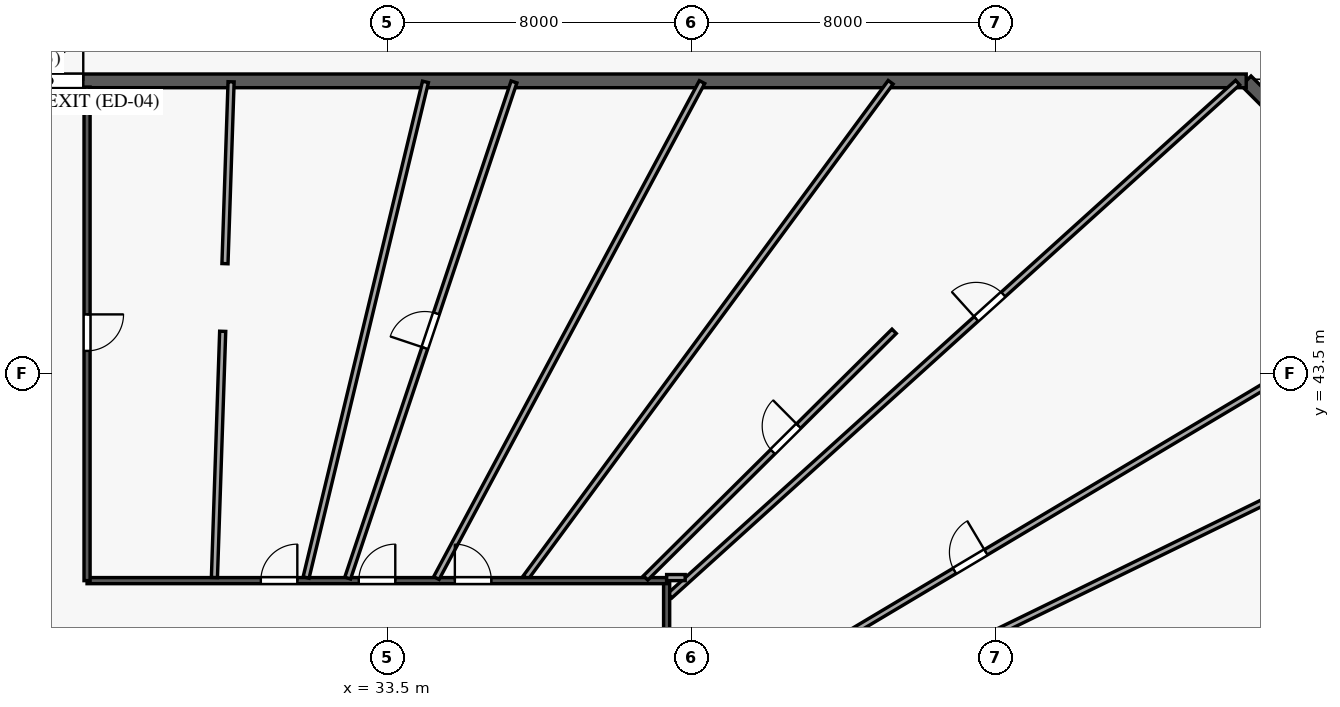
"""IFC4 building model, lengths in metres.
Left out: names, types, materials, properties, quantities, classifications, styles, units other than length and angle.
Written with IfcOpenShell. Run it as: python <this file> out.ifc"""

import sys

from ifc_helpers import new_model, si_unit, direction, frame, frame_2d, origin, origin_with_axes, origin_2d, place, context, subcontext, project, spatial, rectangle, circle, extrude, source, transform, mapped, element, fill, save


model = new_model("IFC4")
c1 = context("Model", 3, precision=1e-05, world=origin(), true_north=direction((0.0, 1.0)))
c2 = subcontext(c1, "Body", "Model", "MODEL_VIEW")
j1 = project(units=[si_unit("LENGTHUNIT", "METRE"), si_unit("PLANEANGLEUNIT", "RADIAN")], contexts=[c1])
p1 = place(None, origin())
s1 = spatial("IfcSite", under=j1, at=p1, CompositionType="ELEMENT")
p2 = place(p1, origin())
s2 = spatial("IfcBuilding", under=s1, at=p2, CompositionType="ELEMENT")
p3 = place(p2, origin())
s3 = spatial("IfcBuildingStorey", under=s2, at=p3, CompositionType="ELEMENT", Elevation=0.0)
m1 = source(origin_with_axes(), c2, "Body", "SweptSolid", [
    extrude(circle(Radius=0.9, at=origin_2d()), origin(), (0.0, 0.0, 1.0), 4.5),
])
for number, where, z_axis, x_axis in (
    (1, (28.5, 45.5, 0.0), (0.0, 0.0, 1.0), (1.0, 0.0, 0.0)),
    (2, (46.8, 45.5, 0.0), (0.0, 0.0, 1.0), (1.0, 0.0, 0.0)),
):
    element("IfcColumn", number, at=place(p3, frame(where, z_axis=z_axis, x_axis=x_axis)), inside=s3, PredefinedType="COLUMN", context=c2, shape_type="MappedRepresentation", body=[
        mapped(m1, transform((0.0, 0.0, 0.0), scale=1.0)),
    ])
m2 = source(origin_with_axes(), c2, "Body", "SweptSolid", [
    extrude(rectangle(XDim=0.6, YDim=0.9, at=origin_2d()), origin(), (0.0, 0.0, 1.0), 4.5),
])
p4 = place(p3, frame((54.8, 42.5, 0.0), z_axis=(0.0, 0.0, 1.0), x_axis=(1.0, 0.0, 0.0)))
e3 = element("IfcColumn", 3, at=p4, inside=s3, PredefinedType="PILASTER", context=c2, shape_type="MappedRepresentation", body=[
    mapped(m2, transform((0.0, 0.0, 0.0), scale=1.0)),
])
p5 = place(p3, frame((56.8, 50.5, 0.0), z_axis=(0.0, 0.0, 1.0), x_axis=(-0.707106781187, 0.707106781187, 0.0)))
e4 = element("IfcWall", 4, at=p5, inside=s3, PredefinedType="SOLIDWALL", context=c2, shape_type="SweptSolid", body=[
    extrude(rectangle(XDim=0.99, YDim=0.36, at=frame_2d((0.495, 0.0))), origin(), (0.0, 0.0, 1.0), 4.2),
])
p6 = place(p3, frame((1.5, 51.2, 0.0), z_axis=(0.0, 0.0, 1.0), x_axis=(1.0, 0.0, 0.0)))
e5 = element("IfcWall", 5, at=p6, inside=s3, PredefinedType="SOLIDWALL", context=c2, shape_type="SweptSolid", body=[
    extrude(rectangle(XDim=54.6, YDim=0.36, at=frame_2d((27.3, 0.0))), origin(), (0.0, 0.0, 1.0), 4.2),
])
p7 = place(p6, frame((51.007, 0.0, 0.85)))
e6 = element("IfcOpeningElement", 6, at=p7, cuts=e5, PredefinedType="OPENING", context=c2, shape_type="SweptSolid", body=[
    extrude(rectangle(XDim=1.8, YDim=2.2, at=frame_2d((0.9, 1.1))), frame((0.0, 0.19, 0.0), z_axis=(0.0, -1.0, 0.0), x_axis=(1.0, 0.0, 0.0)), (0.0, 0.0, 1.0), 0.38),
])
p8 = place(p6, frame((46.765, 0.0, 0.85)))
e7 = element("IfcOpeningElement", 7, at=p8, cuts=e5, PredefinedType="OPENING", context=c2, shape_type="SweptSolid", body=[
    extrude(rectangle(XDim=1.8, YDim=2.2, at=frame_2d((0.9, 1.1))), frame((0.0, 0.19, 0.0), z_axis=(0.0, -1.0, 0.0), x_axis=(1.0, 0.0, 0.0)), (0.0, 0.0, 1.0), 0.38),
])
p9 = place(p6, frame((41.844, 0.0, 0.85)))
e8 = element("IfcOpeningElement", 8, at=p9, cuts=e5, PredefinedType="OPENING", context=c2, shape_type="SweptSolid", body=[
    extrude(rectangle(XDim=1.8, YDim=2.2, at=frame_2d((0.9, 1.1))), frame((0.0, 0.19, 0.0), z_axis=(0.0, -1.0, 0.0), x_axis=(1.0, 0.0, 0.0)), (0.0, 0.0, 1.0), 0.38),
])
p10 = place(p6, frame((36.894, 0.0, 0.85)))
e9 = element("IfcOpeningElement", 9, at=p10, cuts=e5, PredefinedType="OPENING", context=c2, shape_type="SweptSolid", body=[
    extrude(rectangle(XDim=1.8, YDim=2.2, at=frame_2d((0.9, 1.1))), frame((0.0, 0.19, 0.0), z_axis=(0.0, -1.0, 0.0), x_axis=(1.0, 0.0, 0.0)), (0.0, 0.0, 1.0), 0.38),
])
p11 = place(p6, frame((29.542, 0.0, 0.85)))
e10 = element("IfcOpeningElement", 10, at=p11, cuts=e5, PredefinedType="OPENING", context=c2, shape_type="SweptSolid", body=[
    extrude(rectangle(XDim=1.8, YDim=2.2, at=frame_2d((0.9, 1.1))), frame((0.0, 0.19, 0.0), z_axis=(0.0, -1.0, 0.0), x_axis=(1.0, 0.0, 0.0)), (0.0, 0.0, 1.0), 0.38),
])
p12 = place(p6, frame((25.094, 0.0, 0.85)))
e11 = element("IfcOpeningElement", 11, at=p12, cuts=e5, PredefinedType="OPENING", context=c2, shape_type="SweptSolid", body=[
    extrude(rectangle(XDim=1.8, YDim=2.2, at=frame_2d((0.9, 1.1))), frame((0.0, 0.19, 0.0), z_axis=(0.0, -1.0, 0.0), x_axis=(1.0, 0.0, 0.0)), (0.0, 0.0, 1.0), 0.38),
])
p13 = place(p6, frame((11.445, 0.0, 0.85)))
e12 = element("IfcOpeningElement", 12, at=p13, cuts=e5, PredefinedType="OPENING", context=c2, shape_type="SweptSolid", body=[
    extrude(rectangle(XDim=1.8, YDim=2.2, at=frame_2d((0.9, 1.1))), frame((0.0, 0.19, 0.0), z_axis=(0.0, -1.0, 0.0), x_axis=(1.0, 0.0, 0.0)), (0.0, 0.0, 1.0), 0.38),
])
p14 = place(p6, frame((2.908, 0.0, 0.85)))
e13 = element("IfcOpeningElement", 13, at=p14, cuts=e5, PredefinedType="OPENING", context=c2, shape_type="SweptSolid", body=[
    extrude(rectangle(XDim=1.8, YDim=2.2, at=frame_2d((0.9, 1.1))), frame((0.0, 0.19, 0.0), z_axis=(0.0, -1.0, 0.0), x_axis=(1.0, 0.0, 0.0)), (0.0, 0.0, 1.0), 0.38),
])
p15 = place(p6, frame((19.6, 0.0, 0.0)))
e14 = element("IfcOpeningElement", 14, at=p15, cuts=e5, PredefinedType="OPENING", context=c2, shape_type="SweptSolid", body=[
    extrude(rectangle(XDim=1.8, YDim=2.3, at=frame_2d((0.9, 1.15))), frame((0.0, 0.19, 0.0), z_axis=(0.0, -1.0, 0.0), x_axis=(1.0, 0.0, 0.0)), (0.0, 0.0, 1.0), 0.38),
])
p16 = place(p6, frame((22.2, 0.0, 0.0)))
e15 = element("IfcOpeningElement", 15, at=p16, cuts=e5, PredefinedType="OPENING", context=c2, shape_type="SweptSolid", body=[
    extrude(rectangle(XDim=1.8, YDim=2.3, at=frame_2d((0.9, 1.15))), frame((0.0, 0.19, 0.0), z_axis=(0.0, -1.0, 0.0), x_axis=(1.0, 0.0, 0.0)), (0.0, 0.0, 1.0), 0.38),
])
p17 = place(p6, frame((15.5, 0.0, 0.0)))
e16 = element("IfcOpeningElement", 16, at=p17, cuts=e5, PredefinedType="OPENING", context=c2, shape_type="SweptSolid", body=[
    extrude(rectangle(XDim=1.8, YDim=2.3, at=frame_2d((0.9, 1.15))), frame((0.0, 0.19, 0.0), z_axis=(0.0, -1.0, 0.0), x_axis=(1.0, 0.0, 0.0)), (0.0, 0.0, 1.0), 0.38),
])
p18 = place(p3, frame((40.932, 37.652, 0.0), z_axis=(0.0, 0.0, 1.0), x_axis=(0.741982219561, 0.670419559571, 0.0)))
e17 = element("IfcWall", 17, at=p18, inside=s3, PredefinedType="PARTITIONING", context=c2, shape_type="SweptSolid", body=[
    extrude(rectangle(XDim=20.138, YDim=0.16, at=frame_2d((10.069, 0.0))), origin(), (0.0, 0.0, 1.0), 4.2),
])
p19 = place(p18, frame((10.867, 0.0, 0.0)))
e18 = element("IfcOpeningElement", 18, at=p19, cuts=e17, PredefinedType="OPENING", context=c2, shape_type="SweptSolid", body=[
    extrude(rectangle(XDim=0.96, YDim=2.15, at=frame_2d((0.48, 1.075))), frame((0.0, 0.09, 0.0), z_axis=(0.0, -1.0, 0.0), x_axis=(1.0, 0.0, 0.0)), (0.0, 0.0, 1.0), 0.18),
])
p20 = place(p3, frame((40.932, 33.839, 0.0), z_axis=(0.0, 0.0, 1.0), x_axis=(0.859023594577, 0.51193599596, 0.0)))
e19 = element("IfcWall", 19, at=p20, inside=s3, PredefinedType="PARTITIONING", context=c2, shape_type="SweptSolid", body=[
    extrude(rectangle(XDim=18.433, YDim=0.16, at=frame_2d((9.216, 0.0))), origin(), (0.0, 0.0, 1.0), 4.2),
])
p21 = place(p20, frame((8.724, 0.0, 0.0)))
e20 = element("IfcOpeningElement", 20, at=p21, cuts=e19, PredefinedType="OPENING", context=c2, shape_type="SweptSolid", body=[
    extrude(rectangle(XDim=0.96, YDim=2.15, at=frame_2d((0.48, 1.075))), frame((0.0, 0.09, 0.0), z_axis=(0.0, -1.0, 0.0), x_axis=(1.0, 0.0, 0.0)), (0.0, 0.0, 1.0), 0.18),
])
p22 = place(p3, frame((40.85, 38.05, 0.0), z_axis=(0.0, 0.0, 1.0), x_axis=(0.0, -1.0, 0.0)))
e21 = element("IfcWall", 21, at=p22, inside=s3, PredefinedType="PARTITIONING", context=c2, shape_type="SweptSolid", body=[
    extrude(rectangle(XDim=18.508, YDim=0.16, at=frame_2d((9.254, 0.0))), origin(), (0.0, 0.0, 1.0), 3.25),
])
p23 = place(p22, frame((12.99, 0.0, 0.0)))
e22 = element("IfcOpeningElement", 22, at=p23, cuts=e21, PredefinedType="OPENING", context=c2, shape_type="SweptSolid", body=[
    extrude(rectangle(XDim=0.96, YDim=2.15, at=frame_2d((0.48, 1.075))), frame((0.0, 0.09, 0.0), z_axis=(0.0, -1.0, 0.0), x_axis=(1.0, 0.0, 0.0)), (0.0, 0.0, 1.0), 0.18),
])
p24 = place(p22, frame((11.446, 0.0, 0.0)))
e23 = element("IfcOpeningElement", 23, at=p24, cuts=e21, PredefinedType="OPENING", context=c2, shape_type="SweptSolid", body=[
    extrude(rectangle(XDim=0.96, YDim=2.15, at=frame_2d((0.48, 1.075))), frame((0.0, 0.09, 0.0), z_axis=(0.0, -1.0, 0.0), x_axis=(1.0, 0.0, 0.0)), (0.0, 0.0, 1.0), 0.18),
])
p25 = place(p22, frame((8.695, 0.0, 0.0)))
e24 = element("IfcOpeningElement", 24, at=p25, cuts=e21, PredefinedType="OPENING", context=c2, shape_type="SweptSolid", body=[
    extrude(rectangle(XDim=0.96, YDim=2.15, at=frame_2d((0.48, 1.075))), frame((0.0, 0.09, 0.0), z_axis=(0.0, -1.0, 0.0), x_axis=(1.0, 0.0, 0.0)), (0.0, 0.0, 1.0), 0.18),
])
p26 = place(p22, frame((5.944, 0.0, 0.0)))
e25 = element("IfcOpeningElement", 25, at=p26, cuts=e21, PredefinedType="OPENING", context=c2, shape_type="SweptSolid", body=[
    extrude(rectangle(XDim=0.96, YDim=2.15, at=frame_2d((0.48, 1.075))), frame((0.0, 0.09, 0.0), z_axis=(0.0, -1.0, 0.0), x_axis=(1.0, 0.0, 0.0)), (0.0, 0.0, 1.0), 0.18),
])
p27 = place(p22, frame((2.72, 0.0, 0.0)))
e26 = element("IfcOpeningElement", 26, at=p27, cuts=e21, PredefinedType="OPENING", context=c2, shape_type="SweptSolid", body=[
    extrude(rectangle(XDim=0.96, YDim=2.15, at=frame_2d((0.48, 1.075))), frame((0.0, 0.09, 0.0), z_axis=(0.0, -1.0, 0.0), x_axis=(1.0, 0.0, 0.0)), (0.0, 0.0, 1.0), 0.18),
])
p28 = place(p3, frame((40.932, 32.495, 0.0), z_axis=(0.0, 0.0, 1.0), x_axis=(0.898852728793, 0.438250809403, 0.0)))
e27 = element("IfcWall", 27, at=p28, inside=s3, PredefinedType="PARTITIONING", context=c2, shape_type="SweptSolid", body=[
    extrude(rectangle(XDim=17.619, YDim=0.16, at=frame_2d((8.809, 0.0))), origin(), (0.0, 0.0, 1.0), 4.2),
])
p29 = place(p3, frame((37.144, 38.132, 0.0), z_axis=(0.0, 0.0, 1.0), x_axis=(0.593152727381, 0.805089958949, 0.0)))
e28 = element("IfcWall", 28, at=p29, inside=s3, PredefinedType="PARTITIONING", context=c2, shape_type="SweptSolid", body=[
    extrude(rectangle(XDim=16.185, YDim=0.16, at=frame_2d((8.092, 0.0))), origin(), (0.0, 0.0, 1.0), 4.2),
])
p30 = place(p3, frame((25.6, 38.05, 0.0), z_axis=(0.0, 0.0, 1.0), x_axis=(1.0, 0.0, 0.0)))
e29 = element("IfcWall", 29, at=p30, inside=s3, PredefinedType="PARTITIONING", context=c2, shape_type="SweptSolid", body=[
    extrude(rectangle(XDim=15.25, YDim=0.16, at=frame_2d((7.625, 0.0))), origin(), (0.0, 0.0, 1.0), 4.2),
])
p31 = place(p30, frame((9.677, 0.0, 0.0)))
e30 = element("IfcOpeningElement", 30, at=p31, cuts=e29, PredefinedType="OPENING", context=c2, shape_type="SweptSolid", body=[
    extrude(rectangle(XDim=0.96, YDim=2.15, at=frame_2d((0.48, 1.075))), frame((0.0, 0.09, 0.0), z_axis=(0.0, -1.0, 0.0), x_axis=(1.0, 0.0, 0.0)), (0.0, 0.0, 1.0), 0.18),
])
p32 = place(p30, frame((7.15, 0.0, 0.0)))
e31 = element("IfcOpeningElement", 31, at=p32, cuts=e29, PredefinedType="OPENING", context=c2, shape_type="SweptSolid", body=[
    extrude(rectangle(XDim=0.96, YDim=2.15, at=frame_2d((0.48, 1.075))), frame((0.0, 0.09, 0.0), z_axis=(0.0, -1.0, 0.0), x_axis=(1.0, 0.0, 0.0)), (0.0, 0.0, 1.0), 0.18),
])
p33 = place(p30, frame((4.573, 0.0, 0.0)))
e32 = element("IfcOpeningElement", 32, at=p33, cuts=e29, PredefinedType="OPENING", context=c2, shape_type="SweptSolid", body=[
    extrude(rectangle(XDim=0.96, YDim=2.15, at=frame_2d((0.48, 1.075))), frame((0.0, 0.09, 0.0), z_axis=(0.0, -1.0, 0.0), x_axis=(1.0, 0.0, 0.0)), (0.0, 0.0, 1.0), 0.18),
])
p34 = place(p3, frame((34.792, 38.119, 0.0), z_axis=(0.0, 0.0, 1.0), x_axis=(0.472198527924, 0.881492229249, 0.0)))
e33 = element("IfcWall", 33, at=p34, inside=s3, PredefinedType="PARTITIONING", context=c2, shape_type="SweptSolid", body=[
    extrude(rectangle(XDim=14.802, YDim=0.16, at=frame_2d((7.401, 0.0))), origin(), (0.0, 0.0, 1.0), 4.2),
])
p35 = place(p3, frame((32.458, 38.118, 0.0), z_axis=(0.0, 0.0, 1.0), x_axis=(0.317860488547, 0.948137495209, 0.0)))
e34 = element("IfcWall", 34, at=p35, inside=s3, PredefinedType="PARTITIONING", context=c2, shape_type="SweptSolid", body=[
    extrude(rectangle(XDim=13.768, YDim=0.16, at=frame_2d((6.884, 0.0))), origin(), (0.0, 0.0, 1.0), 4.2),
])
p36 = place(p35, frame((6.384, 0.0, 0.0)))
e35 = element("IfcOpeningElement", 35, at=p36, cuts=e34, PredefinedType="OPENING", context=c2, shape_type="SweptSolid", body=[
    extrude(rectangle(XDim=0.96, YDim=2.15, at=frame_2d((0.48, 1.075))), frame((0.0, 0.09, 0.0), z_axis=(0.0, -1.0, 0.0), x_axis=(1.0, 0.0, 0.0)), (0.0, 0.0, 1.0), 0.18),
])
p37 = place(p3, frame((31.363, 38.132, 0.0), z_axis=(0.0, 0.0, 1.0), x_axis=(0.234150049596, 0.972200470209, 0.0)))
e36 = element("IfcWall", 36, at=p37, inside=s3, PredefinedType="PARTITIONING", context=c2, shape_type="SweptSolid", body=[
    extrude(rectangle(XDim=13.414, YDim=0.16, at=frame_2d((6.707, 0.0))), origin(), (0.0, 0.0, 1.0), 4.2),
])
p38 = place(p3, frame((25.6, 51.035, 0.0), z_axis=(0.0, 0.0, 1.0), x_axis=(0.0, -1.0, 0.0)))
e37 = element("IfcWall", 37, at=p38, inside=s3, PredefinedType="PARTITIONING", context=c2, shape_type="SweptSolid", body=[
    extrude(rectangle(XDim=12.985, YDim=0.16, at=frame_2d((6.492, 0.0))), origin(), (0.0, 0.0, 1.0), 4.2),
])
p39 = place(p38, frame((5.98, 0.0, 0.0)))
e38 = element("IfcOpeningElement", 38, at=p39, cuts=e37, PredefinedType="OPENING", context=c2, shape_type="SweptSolid", body=[
    extrude(rectangle(XDim=0.96, YDim=2.15, at=frame_2d((0.48, 1.075))), frame((0.0, 0.09, 0.0), z_axis=(0.0, -1.0, 0.0), x_axis=(1.0, 0.0, 0.0)), (0.0, 0.0, 1.0), 0.18),
])
p40 = place(p3, frame((40.297, 38.121, 0.0), z_axis=(0.0, 0.0, 1.0), x_axis=(0.709818075558, 0.704385050673, 0.0)))
e39 = element("IfcWall", 39, at=p40, inside=s3, PredefinedType="PARTITIONING", context=c2, shape_type="SweptSolid", body=[
    extrude(rectangle(XDim=9.212, YDim=0.16, at=frame_2d((4.606, 0.0))), origin(), (0.0, 0.0, 1.0), 3.25),
])
p41 = place(p40, frame((4.713, 0.0, 0.0)))
e40 = element("IfcOpeningElement", 40, at=p41, cuts=e39, PredefinedType="OPENING", context=c2, shape_type="SweptSolid", body=[
    extrude(rectangle(XDim=0.96, YDim=2.15, at=frame_2d((0.48, 1.075))), frame((0.0, 0.09, 0.0), z_axis=(0.0, -1.0, 0.0), x_axis=(1.0, 0.0, 0.0)), (0.0, 0.0, 1.0), 0.18),
])
p42 = place(p3, frame((28.951, 38.132, 0.0), z_axis=(0.0, 0.0, 1.0), x_axis=(0.033598266136, 0.99943541888, 0.0)))
e41 = element("IfcWall", 41, at=p42, inside=s3, PredefinedType="PARTITIONING", context=c2, shape_type="SweptSolid", body=[
    extrude(rectangle(XDim=6.482, YDim=0.16, at=frame_2d((3.241, 0.0))), origin(), (0.0, 0.0, 1.0), 4.2),
])
p43 = place(p3, frame((29.229, 46.39, 0.0), z_axis=(0.0, 0.0, 1.0), x_axis=(0.033603460508, 0.999435244246, 0.0)))
e42 = element("IfcWall", 42, at=p43, inside=s3, PredefinedType="PARTITIONING", context=c2, shape_type="SweptSolid", body=[
    extrude(rectangle(XDim=4.788, YDim=0.16, at=frame_2d((2.394, 0.0))), origin(), (0.0, 0.0, 1.0), 4.2),
])
p44 = place(p3, frame((41.338, 38.13, 0.0), z_axis=(0.0, 0.0, 1.0), x_axis=(-1.0, 0.0, 0.0)))
e43 = element("IfcWall", 43, at=p44, inside=s3, PredefinedType="PARTITIONING", context=c2, shape_type="SweptSolid", body=[
    extrude(rectangle(XDim=0.488, YDim=0.16, at=frame_2d((0.244, 0.0))), origin(), (0.0, 0.0, 1.0), 4.2),
])
m3 = source(origin_with_axes(), c2, "Body", "SweptSolid", [
    extrude(rectangle(XDim=1.8, YDim=2.2, at=frame_2d((0.9, 1.1))), frame((0.0, 0.03, 0.0), z_axis=(0.0, -1.0, 0.0), x_axis=(1.0, 0.0, 0.0)), (0.0, 0.0, 1.0), 0.06),
])
p45 = place(p7, origin())
e44 = element("IfcWindow", 44, at=p45, inside=s3, PartitioningType="SINGLE_PANEL", PredefinedType="WINDOW", context=c2, shape_type="MappedRepresentation", body=[
    mapped(m3, transform((0.0, 0.0, 0.0), scale=1.0)),
])
fill(e6, e44)
p46 = place(p8, origin())
e45 = element("IfcWindow", 45, at=p46, inside=s3, PartitioningType="SINGLE_PANEL", PredefinedType="WINDOW", context=c2, shape_type="MappedRepresentation", body=[
    mapped(m3, transform((0.0, 0.0, 0.0), scale=1.0)),
])
fill(e7, e45)
p47 = place(p9, origin())
e46 = element("IfcWindow", 46, at=p47, inside=s3, PartitioningType="SINGLE_PANEL", PredefinedType="WINDOW", context=c2, shape_type="MappedRepresentation", body=[
    mapped(m3, transform((0.0, 0.0, 0.0), scale=1.0)),
])
fill(e8, e46)
p48 = place(p10, origin())
e47 = element("IfcWindow", 47, at=p48, inside=s3, PartitioningType="SINGLE_PANEL", PredefinedType="WINDOW", context=c2, shape_type="MappedRepresentation", body=[
    mapped(m3, transform((0.0, 0.0, 0.0), scale=1.0)),
])
fill(e9, e47)
p49 = place(p11, origin())
e48 = element("IfcWindow", 48, at=p49, inside=s3, PartitioningType="SINGLE_PANEL", PredefinedType="WINDOW", context=c2, shape_type="MappedRepresentation", body=[
    mapped(m3, transform((0.0, 0.0, 0.0), scale=1.0)),
])
fill(e10, e48)
p50 = place(p12, origin())
e49 = element("IfcWindow", 49, at=p50, inside=s3, PartitioningType="SINGLE_PANEL", PredefinedType="WINDOW", context=c2, shape_type="MappedRepresentation", body=[
    mapped(m3, transform((0.0, 0.0, 0.0), scale=1.0)),
])
fill(e11, e49)
m4 = source(origin_with_axes(), c2, "Body", "SweptSolid", [
    extrude(rectangle(XDim=1.8, YDim=2.3, at=frame_2d((0.9, 1.15))), frame((0.0, 0.025, 0.0), z_axis=(0.0, -1.0, 0.0), x_axis=(1.0, 0.0, 0.0)), (0.0, 0.0, 1.0), 0.05),
])
p51 = place(p16, origin())
e50 = element("IfcDoor", 50, at=p51, inside=s3, OperationType="DOUBLE_DOOR_SINGLE_SWING", PredefinedType="DOOR", context=c2, shape_type="MappedRepresentation", body=[
    mapped(m4, transform((0.0, 0.0, 0.0), scale=1.0)),
])
fill(e15, e50)
m5 = source(origin_with_axes(), c2, "Body", "SweptSolid", [
    extrude(rectangle(XDim=0.96, YDim=2.15, at=frame_2d((0.48, 1.075))), frame((0.0, 0.025, 0.0), z_axis=(0.0, -1.0, 0.0), x_axis=(1.0, 0.0, 0.0)), (0.0, 0.0, 1.0), 0.05),
])
p52 = place(p21, origin())
e51 = element("IfcDoor", 51, at=p52, inside=s3, OperationType="SINGLE_SWING_RIGHT", PredefinedType="DOOR", context=c2, shape_type="MappedRepresentation", body=[
    mapped(m5, transform((0.0, 0.0, 0.0), scale=1.0)),
])
fill(e20, e51)
p53 = place(p19, origin())
e52 = element("IfcDoor", 52, at=p53, inside=s3, OperationType="SINGLE_SWING_LEFT", PredefinedType="DOOR", context=c2, shape_type="MappedRepresentation", body=[
    mapped(m5, transform((0.0, 0.0, 0.0), scale=1.0)),
])
fill(e18, e52)
p54 = place(p41, origin())
e53 = element("IfcDoor", 53, at=p54, inside=s3, OperationType="SINGLE_SWING_RIGHT", PredefinedType="DOOR", context=c2, shape_type="MappedRepresentation", body=[
    mapped(m5, transform((0.0, 0.0, 0.0), scale=1.0)),
])
fill(e40, e53)
p55 = place(p31, origin())
e54 = element("IfcDoor", 54, at=p55, inside=s3, OperationType="SINGLE_SWING_LEFT", PredefinedType="DOOR", context=c2, shape_type="MappedRepresentation", body=[
    mapped(m5, transform((0.0, 0.0, 0.0), scale=1.0)),
])
fill(e30, e54)
p56 = place(p32, origin())
e55 = element("IfcDoor", 55, at=p56, inside=s3, OperationType="SINGLE_SWING_RIGHT", PredefinedType="DOOR", context=c2, shape_type="MappedRepresentation", body=[
    mapped(m5, transform((0.0, 0.0, 0.0), scale=1.0)),
])
fill(e31, e55)
p57 = place(p36, origin())
e56 = element("IfcDoor", 56, at=p57, inside=s3, OperationType="SINGLE_SWING_LEFT", PredefinedType="DOOR", context=c2, shape_type="MappedRepresentation", body=[
    mapped(m5, transform((0.0, 0.0, 0.0), scale=1.0)),
])
fill(e35, e56)
p58 = place(p33, origin())
e57 = element("IfcDoor", 57, at=p58, inside=s3, OperationType="SINGLE_SWING_RIGHT", PredefinedType="DOOR", context=c2, shape_type="MappedRepresentation", body=[
    mapped(m5, transform((0.0, 0.0, 0.0), scale=1.0)),
])
fill(e32, e57)
p59 = place(p39, origin())
e58 = element("IfcDoor", 58, at=p59, inside=s3, OperationType="SINGLE_SWING_LEFT", PredefinedType="DOOR", context=c2, shape_type="MappedRepresentation", body=[
    mapped(m5, transform((0.0, 0.0, 0.0), scale=1.0)),
])
fill(e38, e58)
save(model, sys.argv[1])
